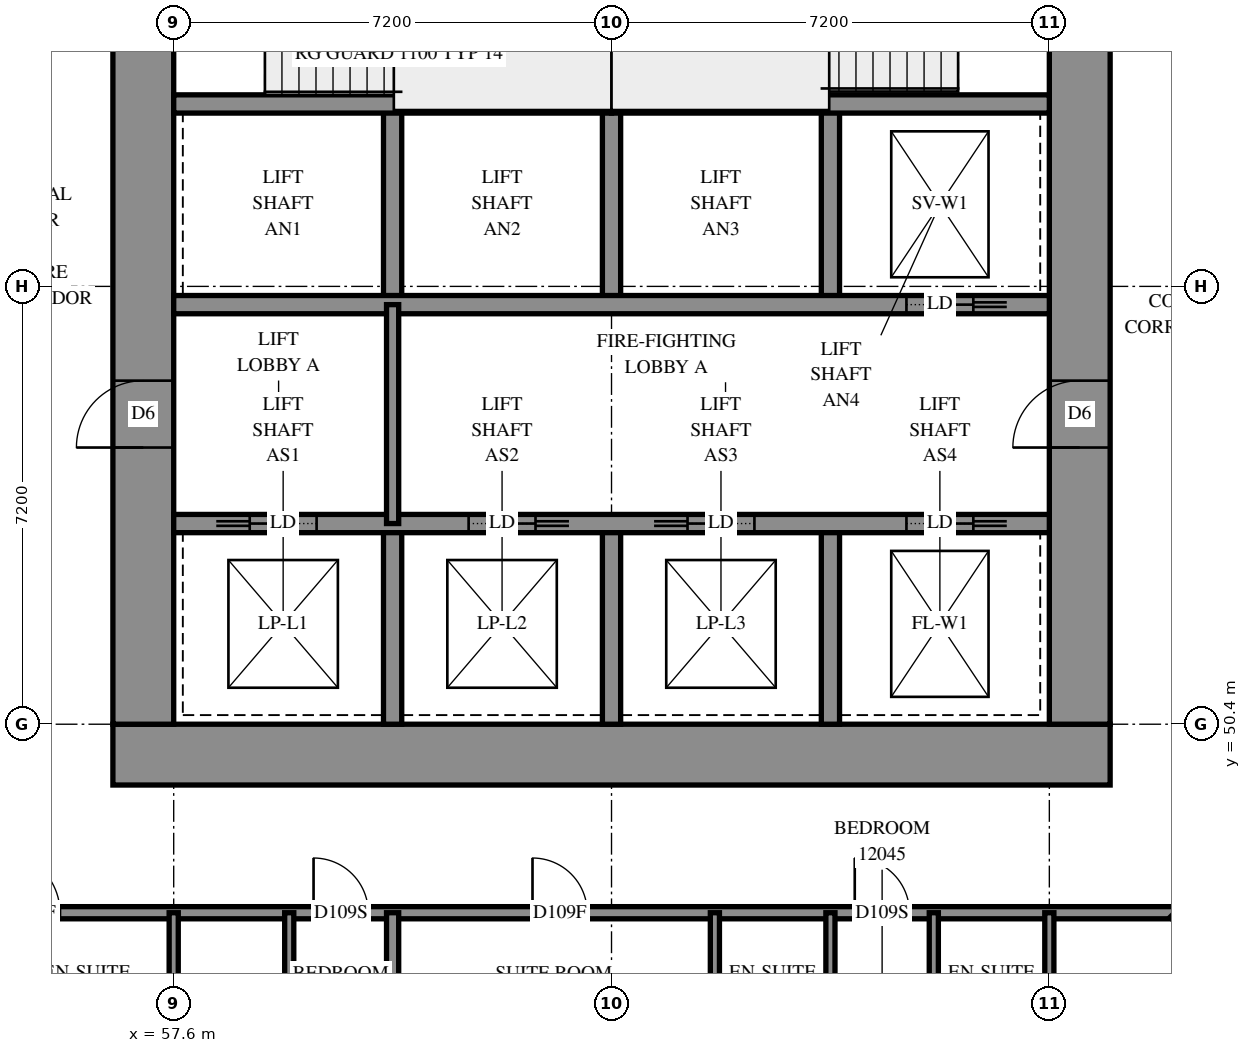
"""IFC4 building model, lengths in metres.
Left out: names, types, materials, properties, quantities, classifications, styles, units other than length and angle.
Written with IfcOpenShell. Run it as: python <this file> out.ifc"""

import sys

from ifc_helpers import new_model, si_unit, direction, frame, frame_2d, origin, place, context, subcontext, project, spatial, rectangle, extrude, element, fill, save


model = new_model("IFC4")
c1 = context("Model", 3, precision=1e-05, world=origin(), true_north=direction((0.0, 1.0)))
c2 = subcontext(c1, "Body", "Model", "MODEL_VIEW")
j1 = project(units=[si_unit("LENGTHUNIT", "METRE"), si_unit("PLANEANGLEUNIT", "RADIAN")], contexts=[c1])
p1 = place(None, origin())
s1 = spatial("IfcSite", under=j1, at=p1, CompositionType="ELEMENT")
p2 = place(p1, origin())
s2 = spatial("IfcBuilding", under=s1, at=p2, CompositionType="ELEMENT")
p3 = place(p2, frame((0.0, 0.0, 47.4)))
s3 = spatial("IfcBuildingStorey", under=s2, at=p3, CompositionType="ELEMENT", Elevation=47.4)
p4 = place(p3, frame((56.6, 49.9, -0.3), z_axis=(0.0, 0.0, 1.0), x_axis=(1.0, 0.0, 0.0)))
e1 = element("IfcWall", 1, at=p4, inside=s3, PredefinedType="SHEAR", context=c2, shape_type="SweptSolid", body=[
    extrude(rectangle(XDim=16.4, YDim=1.0, at=frame_2d((8.2, 0.0))), origin(), (0.0, 0.0, 1.0), 2.7),
])
p5 = place(p3, frame((57.1, 50.4, -0.3), z_axis=(0.0, 0.0, 1.0), x_axis=(0.0, 1.0, 0.0)))
e2 = element("IfcWall", 2, at=p5, inside=s3, PredefinedType="SHEAR", context=c2, shape_type="SweptSolid", body=[
    extrude(rectangle(XDim=14.4, YDim=1.0, at=frame_2d((7.2, 0.0))), origin(), (0.0, 0.0, 1.0), 2.7),
])
p6 = place(p5, frame((4.55, 0.0, 0.3)))
e3 = element("IfcOpeningElement", 3, at=p6, cuts=e2, PredefinedType="OPENING", context=c2, shape_type="SweptSolid", body=[
    extrude(rectangle(XDim=1.1, YDim=2.1, at=frame_2d((0.55, 1.05))), frame((0.0, 0.51, 0.0), z_axis=(0.0, -1.0, 0.0), x_axis=(1.0, 0.0, 0.0)), (0.0, 0.0, 1.0), 1.02),
])
p7 = place(p5, frame((11.35, 0.0, 0.3)))
e4 = element("IfcOpeningElement", 4, at=p7, cuts=e2, PredefinedType="OPENING", context=c2, shape_type="SweptSolid", body=[
    extrude(rectangle(XDim=1.1, YDim=2.1, at=frame_2d((0.55, 1.05))), frame((0.0, 0.51, 0.0), z_axis=(0.0, -1.0, 0.0), x_axis=(1.0, 0.0, 0.0)), (0.0, 0.0, 1.0), 1.02),
])
p8 = place(p3, frame((72.5, 50.4, -0.3), z_axis=(0.0, 0.0, 1.0), x_axis=(0.0, 1.0, 0.0)))
e5 = element("IfcWall", 5, at=p8, inside=s3, PredefinedType="SHEAR", context=c2, shape_type="SweptSolid", body=[
    extrude(rectangle(XDim=14.4, YDim=1.0, at=frame_2d((7.2, 0.0))), origin(), (0.0, 0.0, 1.0), 2.7),
])
p9 = place(p8, frame((4.55, 0.0, 0.3)))
e6 = element("IfcOpeningElement", 6, at=p9, cuts=e5, PredefinedType="OPENING", context=c2, shape_type="SweptSolid", body=[
    extrude(rectangle(XDim=1.1, YDim=2.1, at=frame_2d((0.55, 1.05))), frame((0.0, 0.51, 0.0), z_axis=(0.0, -1.0, 0.0), x_axis=(1.0, 0.0, 0.0)), (0.0, 0.0, 1.0), 1.02),
])
p10 = place(p8, frame((11.35, 0.0, 0.3)))
e7 = element("IfcOpeningElement", 7, at=p10, cuts=e5, PredefinedType="OPENING", context=c2, shape_type="SweptSolid", body=[
    extrude(rectangle(XDim=1.1, YDim=2.1, at=frame_2d((0.55, 1.05))), frame((0.0, 0.51, 0.0), z_axis=(0.0, -1.0, 0.0), x_axis=(1.0, 0.0, 0.0)), (0.0, 0.0, 1.0), 1.02),
])
for number, where, z_axis, x_axis in (
    (8, (61.2, 50.4, 0.0), (0.0, 0.0, 1.0), (0.0, 1.0, 0.0)),
    (9, (61.2, 57.3, 0.0), (0.0, 0.0, 1.0), (0.0, 1.0, 0.0)),
    (10, (64.8, 50.4, 0.0), (0.0, 0.0, 1.0), (0.0, 1.0, 0.0)),
    (11, (64.8, 57.3, 0.0), (0.0, 0.0, 1.0), (0.0, 1.0, 0.0)),
    (12, (68.4, 50.4, 0.0), (0.0, 0.0, 1.0), (0.0, 1.0, 0.0)),
    (13, (68.4, 57.3, 0.0), (0.0, 0.0, 1.0), (0.0, 1.0, 0.0)),
):
    element("IfcWall", number, at=place(p3, frame(where, z_axis=z_axis, x_axis=x_axis)), inside=s3, PredefinedType="SOLIDWALL", context=c2, shape_type="SweptSolid", body=[
        extrude(rectangle(XDim=3.3, YDim=0.3, at=frame_2d((1.65, 0.0))), origin(), (0.0, 0.0, 1.0), 3.1),
    ])
p11 = place(p3, frame((57.6, 53.7, 0.0), z_axis=(0.0, 0.0, 1.0), x_axis=(1.0, 0.0, 0.0)))
e14 = element("IfcWall", 14, at=p11, inside=s3, PredefinedType="SOLIDWALL", context=c2, shape_type="SweptSolid", body=[
    extrude(rectangle(XDim=14.4, YDim=0.3, at=frame_2d((7.2, 0.0))), origin(), (0.0, 0.0, 1.0), 3.1),
])
p12 = place(p11, frame((1.25, 0.0, 0.0)))
e15 = element("IfcOpeningElement", 15, at=p12, cuts=e14, PredefinedType="OPENING", context=c2, shape_type="SweptSolid", body=[
    extrude(rectangle(XDim=1.1, YDim=2.1, at=frame_2d((0.55, 1.05))), frame((0.0, 0.16, 0.0), z_axis=(0.0, -1.0, 0.0), x_axis=(1.0, 0.0, 0.0)), (0.0, 0.0, 1.0), 0.32),
])
p13 = place(p11, frame((4.85, 0.0, 0.0)))
e16 = element("IfcOpeningElement", 16, at=p13, cuts=e14, PredefinedType="OPENING", context=c2, shape_type="SweptSolid", body=[
    extrude(rectangle(XDim=1.1, YDim=2.1, at=frame_2d((0.55, 1.05))), frame((0.0, 0.16, 0.0), z_axis=(0.0, -1.0, 0.0), x_axis=(1.0, 0.0, 0.0)), (0.0, 0.0, 1.0), 0.32),
])
p14 = place(p11, frame((8.45, 0.0, 0.0)))
e17 = element("IfcOpeningElement", 17, at=p14, cuts=e14, PredefinedType="OPENING", context=c2, shape_type="SweptSolid", body=[
    extrude(rectangle(XDim=1.1, YDim=2.1, at=frame_2d((0.55, 1.05))), frame((0.0, 0.16, 0.0), z_axis=(0.0, -1.0, 0.0), x_axis=(1.0, 0.0, 0.0)), (0.0, 0.0, 1.0), 0.32),
])
p15 = place(p11, frame((12.05, 0.0, 0.0)))
e18 = element("IfcOpeningElement", 18, at=p15, cuts=e14, PredefinedType="OPENING", context=c2, shape_type="SweptSolid", body=[
    extrude(rectangle(XDim=1.1, YDim=2.1, at=frame_2d((0.55, 1.05))), frame((0.0, 0.16, 0.0), z_axis=(0.0, -1.0, 0.0), x_axis=(1.0, 0.0, 0.0)), (0.0, 0.0, 1.0), 0.32),
])
p16 = place(p3, frame((57.6, 57.3, 0.0), z_axis=(0.0, 0.0, 1.0), x_axis=(1.0, 0.0, 0.0)))
e19 = element("IfcWall", 19, at=p16, inside=s3, PredefinedType="SOLIDWALL", context=c2, shape_type="SweptSolid", body=[
    extrude(rectangle(XDim=14.4, YDim=0.3, at=frame_2d((7.2, 0.0))), origin(), (0.0, 0.0, 1.0), 3.1),
])
p17 = place(p16, frame((12.05, 0.0, 0.0)))
e20 = element("IfcOpeningElement", 20, at=p17, cuts=e19, PredefinedType="OPENING", context=c2, shape_type="SweptSolid", body=[
    extrude(rectangle(XDim=1.1, YDim=2.1, at=frame_2d((0.55, 1.05))), frame((0.0, 0.16, 0.0), z_axis=(0.0, -1.0, 0.0), x_axis=(1.0, 0.0, 0.0)), (0.0, 0.0, 1.0), 0.32),
])
for number, where, z_axis, x_axis in (
    (21, (57.6, 60.6, 0.0), (0.0, 0.0, 1.0), (1.0, 0.0, 0.0)),
    (22, (64.8, 60.6, 0.0), (0.0, 0.0, 1.0), (1.0, 0.0, 0.0)),
):
    element("IfcWall", number, at=place(p3, frame(where, z_axis=z_axis, x_axis=x_axis)), inside=s3, PredefinedType="SOLIDWALL", context=c2, shape_type="SweptSolid", body=[
        extrude(rectangle(XDim=7.2, YDim=0.3, at=frame_2d((3.6, 0.0))), origin(), (0.0, 0.0, 1.0), 3.1),
    ])
p18 = place(p3, frame((64.8, 60.6, 0.0), z_axis=(0.0, 0.0, 1.0), x_axis=(0.0, 1.0, 0.0)))
e23 = element("IfcWall", 23, at=p18, inside=s3, PredefinedType="SOLIDWALL", context=c2, shape_type="SweptSolid", body=[
    extrude(rectangle(XDim=4.2, YDim=0.3, at=frame_2d((2.1, 0.0))), origin(), (0.0, 0.0, 1.0), 3.1),
])
p19 = place(p3, frame((61.2, 53.7, 0.0), z_axis=(0.0, 0.0, 1.0), x_axis=(0.0, 1.0, 0.0)))
e24 = element("IfcWall", 24, at=p19, inside=s3, PredefinedType="PARTITIONING", context=c2, shape_type="SweptSolid", body=[
    extrude(rectangle(XDim=3.6, YDim=0.2, at=frame_2d((1.8, 0.0))), origin(), (0.0, 0.0, 1.0), 3.1),
])
p20 = place(p3, frame((54.5, 47.3, 0.0), z_axis=(0.0, 0.0, 1.0), x_axis=(1.0, 0.0, 0.0)))
e25 = element("IfcWall", 25, at=p20, inside=s3, PredefinedType="PARTITIONING", context=c2, shape_type="SweptSolid", body=[
    extrude(rectangle(XDim=19.56, YDim=0.2, at=frame_2d((9.78, 0.0))), origin(), (0.0, 0.0, 1.0), 3.1),
])
p21 = place(p20, frame((0.23, 0.0, 0.0)))
e26 = element("IfcOpeningElement", 26, at=p21, cuts=e25, PredefinedType="OPENING", context=c2, shape_type="SweptSolid", body=[
    extrude(rectangle(XDim=1.0, YDim=2.1, at=frame_2d((0.5, 1.05))), frame((0.0, 0.11, 0.0), z_axis=(0.0, -1.0, 0.0), x_axis=(1.0, 0.0, 0.0)), (0.0, 0.0, 1.0), 0.22),
])
p22 = place(p20, frame((5.4, 0.0, 0.0)))
e27 = element("IfcOpeningElement", 27, at=p22, cuts=e25, PredefinedType="OPENING", context=c2, shape_type="SweptSolid", body=[
    extrude(rectangle(XDim=0.9, YDim=2.1, at=frame_2d((0.45, 1.05))), frame((0.0, 0.11, 0.0), z_axis=(0.0, -1.0, 0.0), x_axis=(1.0, 0.0, 0.0)), (0.0, 0.0, 1.0), 0.22),
])
p23 = place(p20, frame((9.001, 0.0, 0.0)))
e28 = element("IfcOpeningElement", 28, at=p23, cuts=e25, PredefinedType="OPENING", context=c2, shape_type="SweptSolid", body=[
    extrude(rectangle(XDim=0.9, YDim=2.1, at=frame_2d((0.45, 1.05))), frame((0.0, 0.11, 0.0), z_axis=(0.0, -1.0, 0.0), x_axis=(1.0, 0.0, 0.0)), (0.0, 0.0, 1.0), 0.22),
])
p24 = place(p20, frame((14.3, 0.0, 0.0)))
e29 = element("IfcOpeningElement", 29, at=p24, cuts=e25, PredefinedType="OPENING", context=c2, shape_type="SweptSolid", body=[
    extrude(rectangle(XDim=0.9, YDim=2.1, at=frame_2d((0.45, 1.05))), frame((0.0, 0.11, 0.0), z_axis=(0.0, -1.0, 0.0), x_axis=(1.0, 0.0, 0.0)), (0.0, 0.0, 1.0), 0.22),
])
p25 = place(p3, frame((61.2, 42.307, 0.0), z_axis=(0.0, 0.0, 1.0), x_axis=(0.0, 1.0, 0.0)))
e30 = element("IfcWall", 30, at=p25, inside=s3, PredefinedType="PARTITIONING", context=c2, shape_type="SweptSolid", body=[
    extrude(rectangle(XDim=4.993, YDim=0.2, at=frame_2d((2.497, 0.0))), origin(), (0.0, 0.0, 1.0), 3.1),
])
p26 = place(p3, frame((74.057, 47.297, 0.0), z_axis=(0.0, 0.0, 1.0), x_axis=(0.7071067812, -0.7071067812, 0.0)))
e31 = element("IfcWall", 31, at=p26, inside=s3, PredefinedType="PARTITIONING", context=c2, shape_type="SweptSolid", body=[
    extrude(rectangle(XDim=4.653, YDim=0.2, at=frame_2d((2.326, 0.0))), origin(), (0.0, 0.0, 1.0), 3.1),
])
p27 = place(p26, frame((0.57, 0.0, 0.0)))
e32 = element("IfcOpeningElement", 32, at=p27, cuts=e31, PredefinedType="OPENING", context=c2, shape_type="SweptSolid", body=[
    extrude(rectangle(XDim=1.0, YDim=2.1, at=frame_2d((0.5, 1.05))), frame((0.0, 0.11, 0.0), z_axis=(0.0, -1.0, 0.0), x_axis=(1.0, 0.0, 0.0)), (0.0, 0.0, 1.0), 0.22),
])
for number, where, z_axis, x_axis in (
    (33, (59.5, 44.9, 0.0), (0.0, 0.0, 1.0), (0.0, 1.0, 0.0)),
    (34, (57.6, 44.9, 0.0), (0.0, 0.0, 1.0), (0.0, 1.0, 0.0)),
    (35, (66.5, 44.9, 0.0), (0.0, 0.0, 1.0), (0.0, 1.0, 0.0)),
    (36, (68.4, 44.9, 0.0), (0.0, 0.0, 1.0), (0.0, 1.0, 0.0)),
    (37, (70.1, 44.9, 0.0), (0.0, 0.0, 1.0), (0.0, 1.0, 0.0)),
    (38, (72.0, 44.9, 0.0), (0.0, 0.0, 1.0), (0.0, 1.0, 0.0)),
):
    element("IfcWall", number, at=place(p3, frame(where, z_axis=z_axis, x_axis=x_axis)), inside=s3, PredefinedType="PARTITIONING", context=c2, shape_type="SweptSolid", body=[
        extrude(rectangle(XDim=2.4, YDim=0.15, at=frame_2d((1.2, 0.0))), origin(), (0.0, 0.0, 1.0), 3.1),
    ])
p28 = place(p6, origin())
e39 = element("IfcDoor", 39, at=p28, inside=s3, OperationType="DOUBLE_DOOR_SINGLE_SWING", PredefinedType="DOOR", context=c2, shape_type="SweptSolid", body=[
    extrude(rectangle(XDim=1.1, YDim=2.1, at=frame_2d((0.55, 1.05))), frame((0.0, 0.025, 0.0), z_axis=(0.0, -1.0, 0.0), x_axis=(1.0, 0.0, 0.0)), (0.0, 0.0, 1.0), 0.05),
])
fill(e3, e39)
p29 = place(p9, origin())
e40 = element("IfcDoor", 40, at=p29, inside=s3, OperationType="DOUBLE_DOOR_SINGLE_SWING", PredefinedType="DOOR", context=c2, shape_type="SweptSolid", body=[
    extrude(rectangle(XDim=1.1, YDim=2.1, at=frame_2d((0.55, 1.05))), frame((0.0, 0.025, 0.0), z_axis=(0.0, -1.0, 0.0), x_axis=(1.0, 0.0, 0.0)), (0.0, 0.0, 1.0), 0.05),
])
fill(e6, e40)
p30 = place(p12, origin())
e41 = element("IfcDoor", 41, at=p30, inside=s3, OperationType="SLIDING_TO_LEFT", PredefinedType="DOOR", context=c2, shape_type="SweptSolid", body=[
    extrude(rectangle(XDim=1.1, YDim=2.1, at=frame_2d((0.55, 1.05))), frame((0.0, 0.025, 0.0), z_axis=(0.0, -1.0, 0.0), x_axis=(1.0, 0.0, 0.0)), (0.0, 0.0, 1.0), 0.05),
])
fill(e15, e41)
p31 = place(p13, origin())
e42 = element("IfcDoor", 42, at=p31, inside=s3, OperationType="SLIDING_TO_RIGHT", PredefinedType="DOOR", context=c2, shape_type="SweptSolid", body=[
    extrude(rectangle(XDim=1.1, YDim=2.1, at=frame_2d((0.55, 1.05))), frame((0.0, 0.025, 0.0), z_axis=(0.0, -1.0, 0.0), x_axis=(1.0, 0.0, 0.0)), (0.0, 0.0, 1.0), 0.05),
])
fill(e16, e42)
p32 = place(p14, origin())
e43 = element("IfcDoor", 43, at=p32, inside=s3, OperationType="SLIDING_TO_LEFT", PredefinedType="DOOR", context=c2, shape_type="SweptSolid", body=[
    extrude(rectangle(XDim=1.1, YDim=2.1, at=frame_2d((0.55, 1.05))), frame((0.0, 0.025, 0.0), z_axis=(0.0, -1.0, 0.0), x_axis=(1.0, 0.0, 0.0)), (0.0, 0.0, 1.0), 0.05),
])
fill(e17, e43)
p33 = place(p15, origin())
e44 = element("IfcDoor", 44, at=p33, inside=s3, OperationType="SLIDING_TO_RIGHT", PredefinedType="DOOR", context=c2, shape_type="SweptSolid", body=[
    extrude(rectangle(XDim=1.1, YDim=2.1, at=frame_2d((0.55, 1.05))), frame((0.0, 0.025, 0.0), z_axis=(0.0, -1.0, 0.0), x_axis=(1.0, 0.0, 0.0)), (0.0, 0.0, 1.0), 0.05),
])
fill(e18, e44)
p34 = place(p17, origin())
e45 = element("IfcDoor", 45, at=p34, inside=s3, OperationType="SLIDING_TO_RIGHT", PredefinedType="DOOR", context=c2, shape_type="SweptSolid", body=[
    extrude(rectangle(XDim=1.1, YDim=2.1, at=frame_2d((0.55, 1.05))), frame((0.0, 0.025, 0.0), z_axis=(0.0, -1.0, 0.0), x_axis=(1.0, 0.0, 0.0)), (0.0, 0.0, 1.0), 0.05),
])
fill(e20, e45)
p35 = place(p21, origin())
e46 = element("IfcDoor", 46, at=p35, inside=s3, OperationType="SINGLE_SWING_RIGHT", PredefinedType="DOOR", context=c2, shape_type="SweptSolid", body=[
    extrude(rectangle(XDim=1.0, YDim=2.1, at=frame_2d((0.5, 1.05))), frame((0.0, 0.025, 0.0), z_axis=(0.0, -1.0, 0.0), x_axis=(1.0, 0.0, 0.0)), (0.0, 0.0, 1.0), 0.05),
])
fill(e26, e46)
p36 = place(p22, origin())
e47 = element("IfcDoor", 47, at=p36, inside=s3, OperationType="SINGLE_SWING_LEFT", PredefinedType="DOOR", context=c2, shape_type="SweptSolid", body=[
    extrude(rectangle(XDim=0.9, YDim=2.1, at=frame_2d((0.45, 1.05))), frame((0.0, 0.025, 0.0), z_axis=(0.0, -1.0, 0.0), x_axis=(1.0, 0.0, 0.0)), (0.0, 0.0, 1.0), 0.05),
])
fill(e27, e47)
p37 = place(p23, origin())
e48 = element("IfcDoor", 48, at=p37, inside=s3, OperationType="SINGLE_SWING_RIGHT", PredefinedType="DOOR", context=c2, shape_type="SweptSolid", body=[
    extrude(rectangle(XDim=0.9, YDim=2.1, at=frame_2d((0.45, 1.05))), frame((0.0, 0.025, 0.0), z_axis=(0.0, -1.0, 0.0), x_axis=(1.0, 0.0, 0.0)), (0.0, 0.0, 1.0), 0.05),
])
fill(e28, e48)
p38 = place(p24, origin())
e49 = element("IfcDoor", 49, at=p38, inside=s3, OperationType="SINGLE_SWING_RIGHT", PredefinedType="DOOR", context=c2, shape_type="SweptSolid", body=[
    extrude(rectangle(XDim=0.9, YDim=2.1, at=frame_2d((0.45, 1.05))), frame((0.0, 0.025, 0.0), z_axis=(0.0, -1.0, 0.0), x_axis=(1.0, 0.0, 0.0)), (0.0, 0.0, 1.0), 0.05),
])
fill(e29, e49)
save(model, sys.argv[1])
